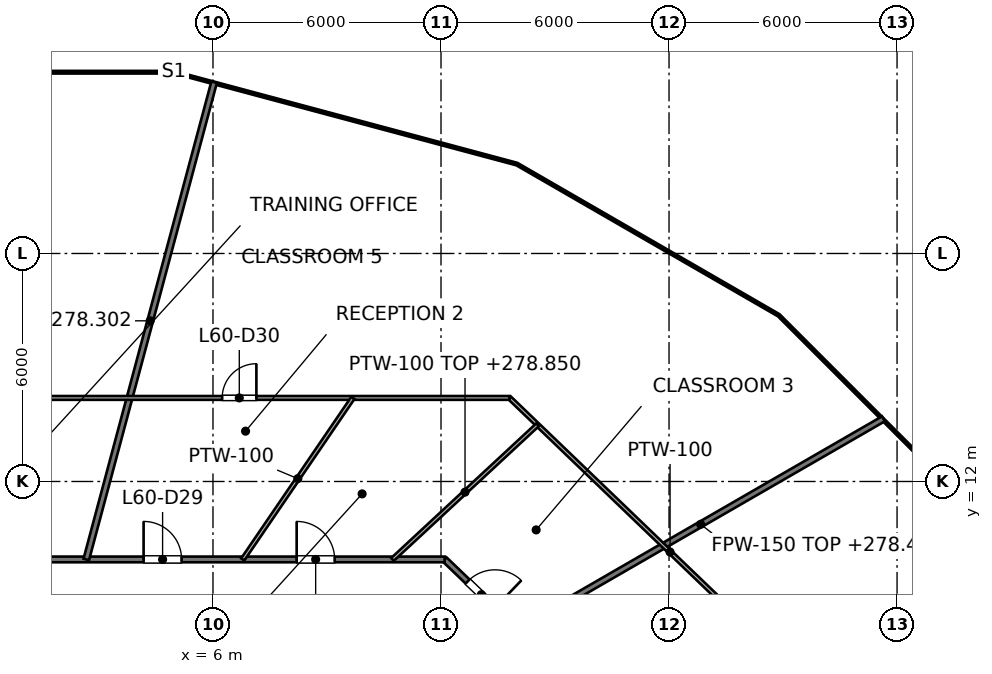
"""IFC4 building model, lengths in metres.
Left out: names, types, materials, properties, quantities, classifications, styles, units other than length and angle.
Written with IfcOpenShell. Run it as: python <this file> out.ifc"""

import sys

from ifc_helpers import new_model, si_unit, direction, frame, frame_2d, origin, place, context, subcontext, project, spatial, rectangle, extrude, element, fill, save


model = new_model("IFC4")
c1 = context("Model", 3, precision=1e-05, world=origin(), true_north=direction((0.0, 1.0)))
c2 = subcontext(c1, "Body", "Model", "MODEL_VIEW")
j1 = project(units=[si_unit("LENGTHUNIT", "METRE"), si_unit("PLANEANGLEUNIT", "RADIAN")], contexts=[c1])
p1 = place(None, origin())
s1 = spatial("IfcSite", under=j1, at=p1, CompositionType="ELEMENT")
p2 = place(p1, origin())
s2 = spatial("IfcBuilding", under=s1, at=p2, CompositionType="ELEMENT")
p3 = place(p2, frame((0.0, 0.0, 275.0)))
s3 = spatial("IfcBuildingStorey", under=s2, at=p3, CompositionType="ELEMENT", Elevation=275.0)
p4 = place(p3, frame((12.095, 9.949, 0.0), z_axis=(0.0, 0.0, 1.0), x_axis=(0.721290181137, -0.692633001376, 0.0)))
e1 = element("IfcWall", 1, at=p4, inside=s3, PredefinedType="PARTITIONING", context=c2, shape_type="SweptSolid", body=[
    extrude(rectangle(XDim=8.187, YDim=0.15, at=frame_2d((4.094, 0.0))), origin(), (0.0, 0.0, 1.0), 2.927),
])
p5 = place(p4, frame((0.838, 0.0, 0.0)))
e2 = element("IfcOpeningElement", 2, at=p5, cuts=e1, PredefinedType="OPENING", context=c2, shape_type="SweptSolid", body=[
    extrude(rectangle(XDim=1.0, YDim=2.1, at=frame_2d((0.5, 1.05))), frame((0.0, 0.075, 0.0), z_axis=(0.0, -1.0, 0.0), x_axis=(1.0, 0.0, 0.0)), (0.0, 0.0, 1.0), 0.15),
])
p6 = place(p3, frame((-12.095, 9.949, 0.0), z_axis=(0.0, 0.0, 1.0), x_axis=(1.0, 0.0, 0.0)))
e3 = element("IfcWall", 3, at=p6, inside=s3, PredefinedType="PARTITIONING", context=c2, shape_type="SweptSolid", body=[
    extrude(rectangle(XDim=24.19, YDim=0.15, at=frame_2d((12.095, 0.0))), origin(), (0.0, 0.0, 1.0), 2.927),
])
p7 = place(p6, frame((20.297, 0.0, 0.0)))
e4 = element("IfcOpeningElement", 4, at=p7, cuts=e3, PredefinedType="OPENING", context=c2, shape_type="SweptSolid", body=[
    extrude(rectangle(XDim=1.0, YDim=2.1, at=frame_2d((0.5, 1.05))), frame((0.0, 0.075, 0.0), z_axis=(0.0, -1.0, 0.0), x_axis=(1.0, 0.0, 0.0)), (0.0, 0.0, 1.0), 0.15),
])
p8 = place(p6, frame((16.269, 0.0, 0.0)))
e5 = element("IfcOpeningElement", 5, at=p8, cuts=e3, PredefinedType="OPENING", context=c2, shape_type="SweptSolid", body=[
    extrude(rectangle(XDim=1.0, YDim=2.1, at=frame_2d((0.5, 1.05))), frame((0.0, 0.075, 0.0), z_axis=(0.0, -1.0, 0.0), x_axis=(1.0, 0.0, 0.0)), (0.0, 0.0, 1.0), 0.15),
])
p9 = place(p6, frame((12.14, 0.0, 0.0)))
e6 = element("IfcOpeningElement", 6, at=p9, cuts=e3, PredefinedType="OPENING", context=c2, shape_type="SweptSolid", body=[
    extrude(rectangle(XDim=1.0, YDim=2.1, at=frame_2d((0.5, 1.05))), frame((0.0, 0.075, 0.0), z_axis=(0.0, -1.0, 0.0), x_axis=(1.0, 0.0, 0.0)), (0.0, 0.0, 1.0), 0.15),
])
p10 = place(p6, frame((5.782, 0.0, 0.0)))
e7 = element("IfcOpeningElement", 7, at=p10, cuts=e3, PredefinedType="OPENING", context=c2, shape_type="SweptSolid", body=[
    extrude(rectangle(XDim=1.0, YDim=2.1, at=frame_2d((0.5, 1.05))), frame((0.0, 0.075, 0.0), z_axis=(0.0, -1.0, 0.0), x_axis=(1.0, 0.0, 0.0)), (0.0, 0.0, 1.0), 0.15),
])
p11 = place(p3, frame((14.024, 8.097, 0.0), z_axis=(0.0, 0.0, 1.0), x_axis=(0.866044269757, 0.499967321754, 0.0)))
e8 = element("IfcWall", 8, at=p11, inside=s3, PredefinedType="PARTITIONING", context=c2, shape_type="SweptSolid", body=[
    extrude(rectangle(XDim=11.105, YDim=0.15, at=frame_2d((5.552, 0.0))), origin(), (0.0, 0.0, 1.0), 3.475),
])
p12 = place(p3, frame((2.666, 9.949, 0.0), z_axis=(0.0, 0.0, 1.0), x_axis=(0.258770502435, 0.96593883195, 0.0)))
e9 = element("IfcWall", 9, at=p12, inside=s3, PredefinedType="PARTITIONING", context=c2, shape_type="SweptSolid", body=[
    extrude(rectangle(XDim=13.001, YDim=0.15, at=frame_2d((6.5, 0.0))), origin(), (0.0, 0.0, 1.0), 3.302),
])
p13 = place(p3, frame((13.805, 14.199, 0.0), z_axis=(0.0, 0.0, 1.0), x_axis=(0.721245635319, -0.692679387259, 0.0)))
e10 = element("IfcWall", 10, at=p13, inside=s3, PredefinedType="PARTITIONING", context=c2, shape_type="SweptSolid", body=[
    extrude(rectangle(XDim=11.709, YDim=0.1, at=frame_2d((5.854, 0.0))), origin(), (0.0, 0.0, 1.0), 2.927),
])
p14 = place(p3, frame((-13.805, 14.199, 0.0), z_axis=(0.0, 0.0, 1.0), x_axis=(1.0, 0.0, 0.0)))
e11 = element("IfcWall", 11, at=p14, inside=s3, PredefinedType="PARTITIONING", context=c2, shape_type="SweptSolid", body=[
    extrude(rectangle(XDim=27.61, YDim=0.1, at=frame_2d((13.805, 0.0))), origin(), (0.0, 0.0, 1.0), 2.927),
])
p15 = place(p14, frame((20.047, 0.0, 0.0)))
e12 = element("IfcOpeningElement", 12, at=p15, cuts=e11, PredefinedType="OPENING", context=c2, shape_type="SweptSolid", body=[
    extrude(rectangle(XDim=0.9, YDim=2.1, at=frame_2d((0.45, 1.05))), frame((0.0, 0.05, 0.0), z_axis=(0.0, -1.0, 0.0), x_axis=(1.0, 0.0, 0.0)), (0.0, 0.0, 1.0), 0.1),
])
p16 = place(p14, frame((4.928, 0.0, 0.0)))
e13 = element("IfcOpeningElement", 13, at=p16, cuts=e11, PredefinedType="OPENING", context=c2, shape_type="SweptSolid", body=[
    extrude(rectangle(XDim=1.8, YDim=2.1, at=frame_2d((0.9, 1.05))), frame((0.0, 0.05, 0.0), z_axis=(0.0, -1.0, 0.0), x_axis=(1.0, 0.0, 0.0)), (0.0, 0.0, 1.0), 0.1),
])
p17 = place(p3, frame((10.723, 9.949, 0.0), z_axis=(0.0, 0.0, 1.0), x_axis=(0.733025495712, 0.680201163359, 0.0)))
e14 = element("IfcWall", 14, at=p17, inside=s3, PredefinedType="PARTITIONING", context=c2, shape_type="SweptSolid", body=[
    extrude(rectangle(XDim=5.209, YDim=0.1, at=frame_2d((2.604, 0.0))), origin(), (0.0, 0.0, 1.0), 3.85),
])
p18 = place(p3, frame((6.783, 9.949, 0.0), z_axis=(0.0, 0.0, 1.0), x_axis=(0.563366278439, 0.826207259904, 0.0)))
e15 = element("IfcWall", 15, at=p18, inside=s3, PredefinedType="PARTITIONING", context=c2, shape_type="SweptSolid", body=[
    extrude(rectangle(XDim=5.144, YDim=0.1, at=frame_2d((2.572, 0.0))), origin(), (0.0, 0.0, 1.0), 2.927),
])
p19 = place(p5, origin())
e16 = element("IfcDoor", 16, at=p19, inside=s3, OperationType="SINGLE_SWING_RIGHT", PredefinedType="DOOR", context=c2, shape_type="SweptSolid", body=[
    extrude(rectangle(XDim=1.0, YDim=2.1, at=frame_2d((0.5, 1.05))), frame((0.0, 0.025, 0.0), z_axis=(0.0, -1.0, 0.0), x_axis=(1.0, 0.0, 0.0)), (0.0, 0.0, 1.0), 0.05),
])
fill(e2, e16)
p20 = place(p7, origin())
e17 = element("IfcDoor", 17, at=p20, inside=s3, OperationType="SINGLE_SWING_LEFT", PredefinedType="DOOR", context=c2, shape_type="SweptSolid", body=[
    extrude(rectangle(XDim=1.0, YDim=2.1, at=frame_2d((0.5, 1.05))), frame((0.0, 0.025, 0.0), z_axis=(0.0, -1.0, 0.0), x_axis=(1.0, 0.0, 0.0)), (0.0, 0.0, 1.0), 0.05),
])
fill(e4, e17)
p21 = place(p8, origin())
e18 = element("IfcDoor", 18, at=p21, inside=s3, OperationType="SINGLE_SWING_LEFT", PredefinedType="DOOR", context=c2, shape_type="SweptSolid", body=[
    extrude(rectangle(XDim=1.0, YDim=2.1, at=frame_2d((0.5, 1.05))), frame((0.0, 0.025, 0.0), z_axis=(0.0, -1.0, 0.0), x_axis=(1.0, 0.0, 0.0)), (0.0, 0.0, 1.0), 0.05),
])
fill(e5, e18)
p22 = place(p15, origin())
e19 = element("IfcDoor", 19, at=p22, inside=s3, OperationType="SINGLE_SWING_RIGHT", PredefinedType="DOOR", context=c2, shape_type="SweptSolid", body=[
    extrude(rectangle(XDim=0.9, YDim=2.1, at=frame_2d((0.45, 1.05))), frame((0.0, 0.025, 0.0), z_axis=(0.0, -1.0, 0.0), x_axis=(1.0, 0.0, 0.0)), (0.0, 0.0, 1.0), 0.05),
])
fill(e12, e19)
save(model, sys.argv[1])
